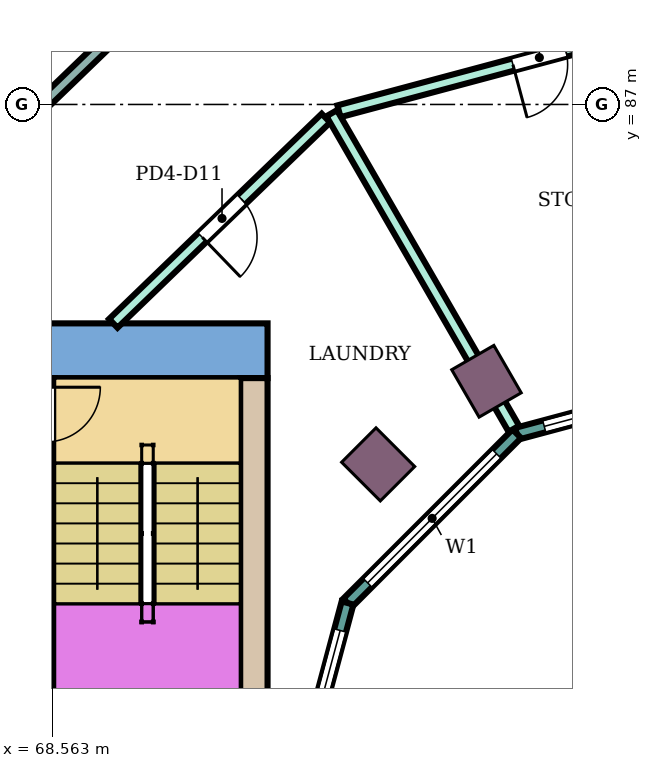
"""IFC4 building model, lengths in metres.
Left out: names, types, materials, properties, quantities, classifications, styles, units other than length and angle.
Written with IfcOpenShell. Run it as: python <this file> out.ifc"""

import sys

from ifc_helpers import new_model, si_unit, direction, frame, frame_2d, origin, origin_2d, place, context, subcontext, project, spatial, rectangle, extrude, element, fill, save


model = new_model("IFC4")
c1 = context("Model", 3, precision=1e-05, world=origin(), true_north=direction((0.0, 1.0)))
c2 = subcontext(c1, "Body", "Model", "MODEL_VIEW")
j1 = project(units=[si_unit("LENGTHUNIT", "METRE"), si_unit("PLANEANGLEUNIT", "RADIAN")], contexts=[c1])
p1 = place(None, origin())
s1 = spatial("IfcSite", under=j1, at=p1, CompositionType="ELEMENT")
p2 = place(p1, origin())
s2 = spatial("IfcBuilding", under=s1, at=p2, CompositionType="ELEMENT")
p3 = place(p2, frame((0.0, 0.0, 23.8)))
s3 = spatial("IfcBuildingStorey", under=s2, at=p3, CompositionType="ELEMENT", Elevation=23.8)
for number, where, z_axis, x_axis in (
    (1, (75.7, 82.448, 0.0), (0.0, 0.0, 1.0), (-0.5, 0.866, 0.0)),
    (2, (73.919, 81.081, 0.0), (0.0, 0.0, 1.0), (-0.707, 0.707, 0.0)),
):
    element("IfcColumn", number, at=place(p3, frame(where, z_axis=z_axis, x_axis=x_axis)), inside=s3, PredefinedType="COLUMN", context=c2, shape_type="SweptSolid", body=[
        extrude(rectangle(XDim=0.9, YDim=0.8, at=origin_2d()), origin(), (0.0, 0.0, 1.0), 5.0),
    ])
p4 = place(p3, frame((72.1, 82.95, 0.0), z_axis=(0.0, 0.0, 1.0), x_axis=(-1.0, 0.0, 0.0)))
e3 = element("IfcWall", 3, at=p4, inside=s3, PredefinedType="SHEAR", context=c2, shape_type="SweptSolid", body=[
    extrude(rectangle(XDim=14.6, YDim=0.9, at=frame_2d((7.3, 0.0))), origin(), (0.0, 0.0, 1.0), 4.68),
])
p5 = place(p4, frame((4.2, 0.0, 0.0)))
e4 = element("IfcOpeningElement", 4, at=p5, cuts=e3, PredefinedType="OPENING", context=c2, shape_type="SweptSolid", body=[
    extrude(rectangle(XDim=2.4, YDim=2.4, at=frame_2d((1.2, 1.2))), frame((0.0, 0.46, 0.0), z_axis=(0.0, -1.0, 0.0), x_axis=(1.0, 0.0, 0.0)), (0.0, 0.0, 1.0), 0.92),
])
p6 = place(p3, frame((71.875, 82.5, 0.0), z_axis=(0.0, 0.0, 1.0), x_axis=(0.0, -1.0, 0.0)))
e5 = element("IfcWall", 5, at=p6, inside=s3, PredefinedType="SHEAR", context=c2, shape_type="SweptSolid", body=[
    extrude(rectangle(XDim=7.5, YDim=0.45, at=frame_2d((3.75, 0.0))), origin(), (0.0, 0.0, 1.0), 4.68),
])
p7 = place(p3, frame((68.45, 82.5, 0.0), z_axis=(0.0, 0.0, 1.0), x_axis=(0.0, -1.0, 0.0)))
e6 = element("IfcWall", 6, at=p7, inside=s3, PredefinedType="SHEAR", context=c2, shape_type="SweptSolid", body=[
    extrude(rectangle(XDim=7.5, YDim=0.3, at=frame_2d((3.75, 0.0))), origin(), (0.0, 0.0, 1.0), 4.68),
])
p8 = place(p7, frame((0.15, 0.0, 0.0)))
e7 = element("IfcOpeningElement", 7, at=p8, cuts=e6, PredefinedType="OPENING", context=c2, shape_type="SweptSolid", body=[
    extrude(rectangle(XDim=0.9, YDim=2.1, at=frame_2d((0.45, 1.05))), frame((0.0, 0.16, 0.0), z_axis=(0.0, -1.0, 0.0), x_axis=(1.0, 0.0, 0.0)), (0.0, 0.0, 1.0), 0.32),
])
p9 = place(p3, frame((80.0, 82.604, 0.0), z_axis=(0.0, 0.0, 1.0), x_axis=(-0.965933654434, -0.258789828301, 0.0)))
e8 = element("IfcWall", 8, at=p9, inside=s3, PredefinedType="NOTDEFINED", context=c2, shape_type="SweptSolid", body=[
    extrude(rectangle(XDim=3.936, YDim=0.2, at=frame_2d((1.968, 0.0))), origin(), (0.0, 0.0, 1.0), 5.0),
])
p10 = place(p9, frame((0.468, 0.0, 0.9)))
e9 = element("IfcOpeningElement", 9, at=p10, cuts=e8, PredefinedType="OPENING", context=c2, shape_type="SweptSolid", body=[
    extrude(rectangle(XDim=3.0, YDim=2.3, at=frame_2d((1.5, 1.15))), frame((0.0, 0.11, 0.0), z_axis=(0.0, -1.0, 0.0), x_axis=(1.0, 0.0, 0.0)), (0.0, 0.0, 1.0), 0.22),
])
p11 = place(p3, frame((76.198, 81.585, 0.0), z_axis=(0.0, 0.0, 1.0), x_axis=(-0.707106781187, -0.707106781187, 0.0)))
e10 = element("IfcWall", 10, at=p11, inside=s3, PredefinedType="NOTDEFINED", context=c2, shape_type="SweptSolid", body=[
    extrude(rectangle(XDim=3.936, YDim=0.2, at=frame_2d((1.968, 0.0))), origin(), (0.0, 0.0, 1.0), 5.0),
])
p12 = place(p11, frame((0.468, 0.0, 0.9)))
e11 = element("IfcOpeningElement", 11, at=p12, cuts=e10, PredefinedType="OPENING", context=c2, shape_type="SweptSolid", body=[
    extrude(rectangle(XDim=3.0, YDim=2.3, at=frame_2d((1.5, 1.15))), frame((0.0, 0.11, 0.0), z_axis=(0.0, -1.0, 0.0), x_axis=(1.0, 0.0, 0.0)), (0.0, 0.0, 1.0), 0.22),
])
p13 = place(p3, frame((73.415, 78.802, 0.0), z_axis=(0.0, 0.0, 1.0), x_axis=(-0.258789828301, -0.965933654434, 0.0)))
e12 = element("IfcWall", 12, at=p13, inside=s3, PredefinedType="NOTDEFINED", context=c2, shape_type="SweptSolid", body=[
    extrude(rectangle(XDim=3.936, YDim=0.2, at=frame_2d((1.968, 0.0))), origin(), (0.0, 0.0, 1.0), 5.0),
])
p14 = place(p13, frame((0.468, 0.0, 0.9)))
e13 = element("IfcOpeningElement", 13, at=p14, cuts=e12, PredefinedType="OPENING", context=c2, shape_type="SweptSolid", body=[
    extrude(rectangle(XDim=3.0, YDim=2.3, at=frame_2d((1.5, 1.15))), frame((0.0, 0.11, 0.0), z_axis=(0.0, -1.0, 0.0), x_axis=(1.0, 0.0, 0.0)), (0.0, 0.0, 1.0), 0.22),
])
p15 = place(p3, frame((66.22, 84.9, 0.0), z_axis=(0.0, 0.0, 1.0), x_axis=(0.719621348931, 0.694366700068, 0.0)))
e14 = element("IfcWall", 14, at=p15, inside=s3, PredefinedType="PARTITIONING", context=c2, shape_type="SweptSolid", body=[
    extrude(rectangle(XDim=7.173, YDim=0.2, at=frame_2d((3.586, 0.0))), origin(), (0.0, 0.0, 1.0), 4.18),
])
p16 = place(p15, frame((4.519, 0.0, 0.0)))
e15 = element("IfcOpeningElement", 15, at=p16, cuts=e14, PredefinedType="OPENING", context=c2, shape_type="SweptSolid", body=[
    extrude(rectangle(XDim=0.9, YDim=2.1, at=frame_2d((0.45, 1.05))), frame((0.0, 0.11, 0.0), z_axis=(0.0, -1.0, 0.0), x_axis=(1.0, 0.0, 0.0)), (0.0, 0.0, 1.0), 0.22),
])
p17 = place(p15, frame((0.932, 0.0, 0.0)))
e16 = element("IfcOpeningElement", 16, at=p17, cuts=e14, PredefinedType="OPENING", context=c2, shape_type="SweptSolid", body=[
    extrude(rectangle(XDim=0.9, YDim=2.1, at=frame_2d((0.45, 1.05))), frame((0.0, 0.11, 0.0), z_axis=(0.0, -1.0, 0.0), x_axis=(1.0, 0.0, 0.0)), (0.0, 0.0, 1.0), 0.22),
])
p18 = place(p3, frame((69.563, 83.4, 0.0), z_axis=(0.0, 0.0, 1.0), x_axis=(0.719454254864, 0.694539829785, 0.0)))
e17 = element("IfcWall", 17, at=p18, inside=s3, PredefinedType="PARTITIONING", context=c2, shape_type="SweptSolid", body=[
    extrude(rectangle(XDim=4.86, YDim=0.2, at=frame_2d((2.43, 0.0))), origin(), (0.0, 0.0, 1.0), 4.55),
])
p19 = place(p18, frame((2.035, 0.0, 0.0)))
e18 = element("IfcOpeningElement", 18, at=p19, cuts=e17, PredefinedType="OPENING", context=c2, shape_type="SweptSolid", body=[
    extrude(rectangle(XDim=0.9, YDim=2.1, at=frame_2d((0.45, 1.05))), frame((0.0, 0.11, 0.0), z_axis=(0.0, -1.0, 0.0), x_axis=(1.0, 0.0, 0.0)), (0.0, 0.0, 1.0), 0.22),
])
p20 = place(p3, frame((73.274, 86.888, 0.0), z_axis=(0.0, 0.0, 1.0), x_axis=(0.965941353683, 0.258761089124, 0.0)))
e19 = element("IfcWall", 19, at=p20, inside=s3, PredefinedType="PARTITIONING", context=c2, shape_type="SweptSolid", body=[
    extrude(rectangle(XDim=6.833, YDim=0.2, at=frame_2d((3.417, 0.0))), origin(), (0.0, 0.0, 1.0), 4.55),
])
p21 = place(p20, frame((2.961, 0.0, 0.0)))
e20 = element("IfcOpeningElement", 20, at=p21, cuts=e19, PredefinedType="OPENING", context=c2, shape_type="SweptSolid", body=[
    extrude(rectangle(XDim=0.9, YDim=2.1, at=frame_2d((0.45, 1.05))), frame((0.0, 0.11, 0.0), z_axis=(0.0, -1.0, 0.0), x_axis=(1.0, 0.0, 0.0)), (0.0, 0.0, 1.0), 0.22),
])
p22 = place(p3, frame((73.155, 86.856, 0.0), z_axis=(0.0, 0.0, 1.0), x_axis=(0.499999919892, -0.866025450035, 0.0)))
e21 = element("IfcWall", 21, at=p22, inside=s3, PredefinedType="PARTITIONING", context=c2, shape_type="SweptSolid", body=[
    extrude(rectangle(XDim=5.992, YDim=0.2, at=frame_2d((2.996, 0.0))), origin(), (0.0, 0.0, 1.0), 4.55),
])
p23 = place(p10, origin())
e22 = element("IfcWindow", 22, at=p23, inside=s3, PartitioningType="SINGLE_PANEL", PredefinedType="WINDOW", context=c2, shape_type="SweptSolid", body=[
    extrude(rectangle(XDim=3.0, YDim=2.3, at=frame_2d((1.5, 1.15))), frame((0.0, 0.03, 0.0), z_axis=(0.0, -1.0, 0.0), x_axis=(1.0, 0.0, 0.0)), (0.0, 0.0, 1.0), 0.06),
])
fill(e9, e22)
p24 = place(p12, origin())
e23 = element("IfcWindow", 23, at=p24, inside=s3, PartitioningType="SINGLE_PANEL", PredefinedType="WINDOW", context=c2, shape_type="SweptSolid", body=[
    extrude(rectangle(XDim=3.0, YDim=2.3, at=frame_2d((1.5, 1.15))), frame((0.0, 0.03, 0.0), z_axis=(0.0, -1.0, 0.0), x_axis=(1.0, 0.0, 0.0)), (0.0, 0.0, 1.0), 0.06),
])
fill(e11, e23)
p25 = place(p14, origin())
e24 = element("IfcWindow", 24, at=p25, inside=s3, PartitioningType="SINGLE_PANEL", PredefinedType="WINDOW", context=c2, shape_type="SweptSolid", body=[
    extrude(rectangle(XDim=3.0, YDim=2.3, at=frame_2d((1.5, 1.15))), frame((0.0, 0.03, 0.0), z_axis=(0.0, -1.0, 0.0), x_axis=(1.0, 0.0, 0.0)), (0.0, 0.0, 1.0), 0.06),
])
fill(e13, e24)
p26 = place(p21, frame((0.9, 0.0, 0.0), z_axis=(0.0, 0.0, 1.0), x_axis=(-1.0, 0.0, 0.0)))
e25 = element("IfcDoor", 25, at=p26, inside=s3, OperationType="SINGLE_SWING_RIGHT", PredefinedType="DOOR", context=c2, shape_type="SweptSolid", body=[
    extrude(rectangle(XDim=0.9, YDim=2.1, at=frame_2d((0.45, 1.05))), frame((0.0, 0.025, 0.0), z_axis=(0.0, -1.0, 0.0), x_axis=(1.0, 0.0, 0.0)), (0.0, 0.0, 1.0), 0.05),
])
fill(e20, e25)
p27 = place(p19, frame((0.9, 0.0, 0.0), z_axis=(0.0, 0.0, 1.0), x_axis=(-1.0, 0.0, 0.0)))
e26 = element("IfcDoor", 26, at=p27, inside=s3, OperationType="SINGLE_SWING_RIGHT", PredefinedType="DOOR", context=c2, shape_type="SweptSolid", body=[
    extrude(rectangle(XDim=0.9, YDim=2.1, at=frame_2d((0.45, 1.05))), frame((0.0, 0.025, 0.0), z_axis=(0.0, -1.0, 0.0), x_axis=(1.0, 0.0, 0.0)), (0.0, 0.0, 1.0), 0.05),
])
fill(e18, e26)
save(model, sys.argv[1])
